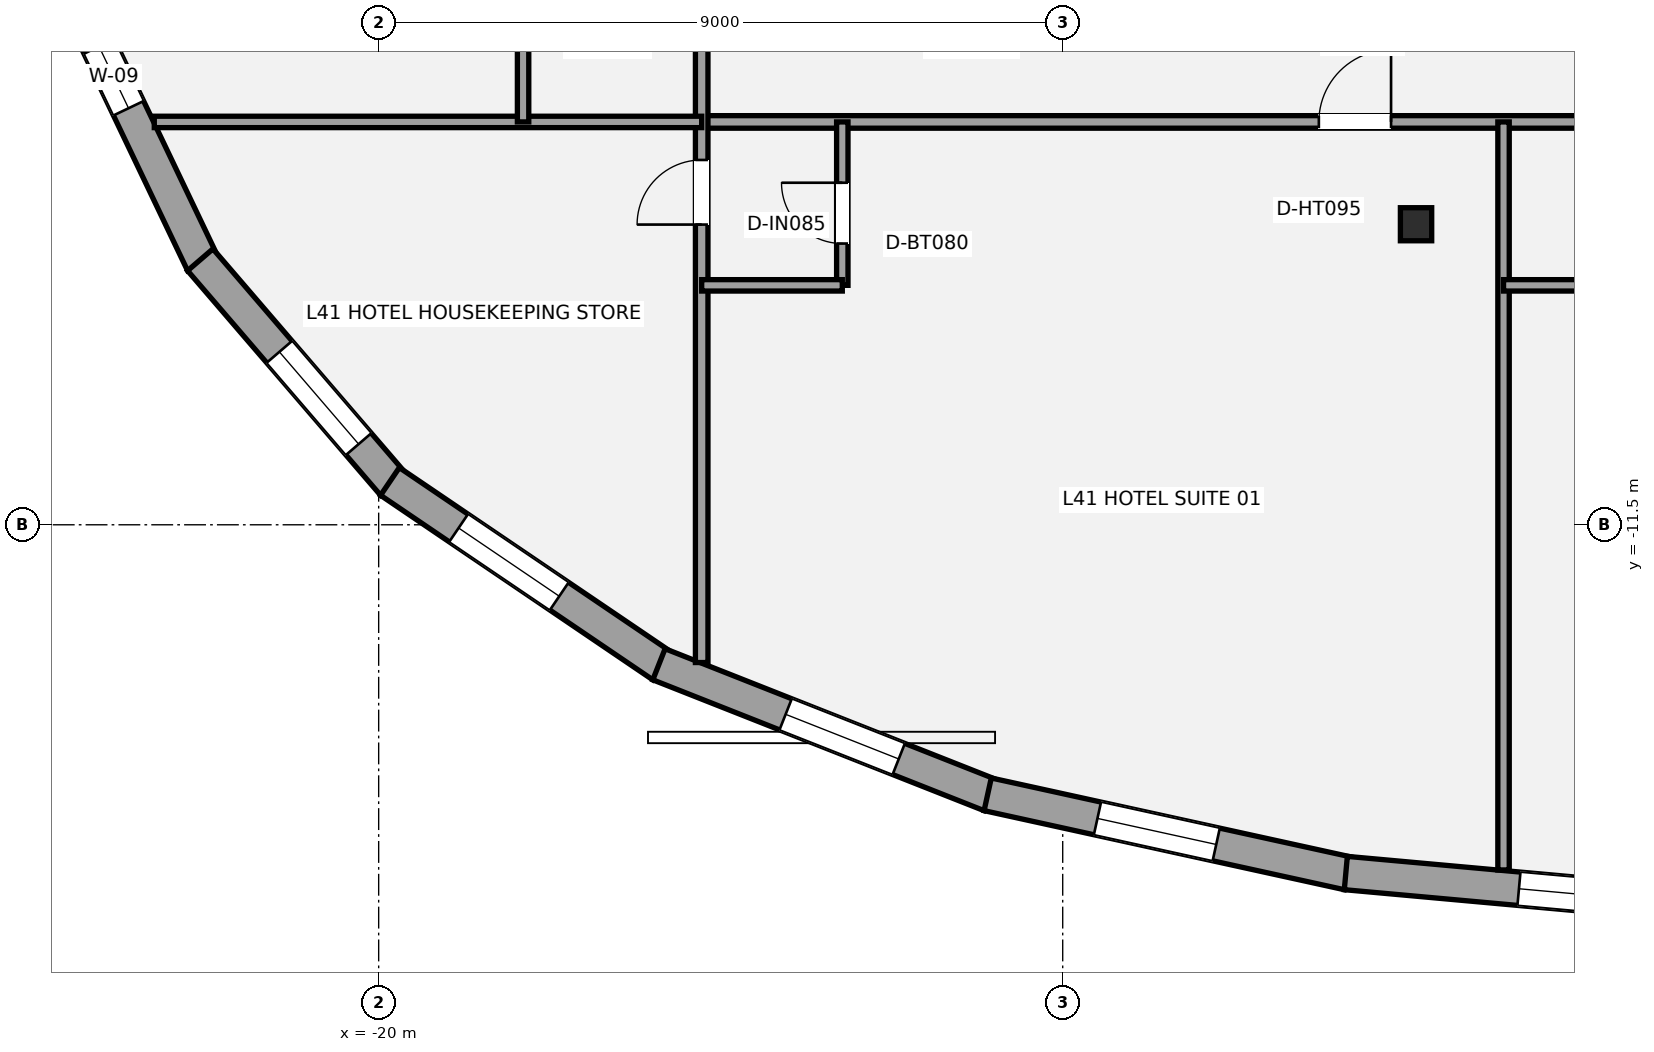
"""IFC4 building model, lengths in metres.
Left out: names, types, materials, properties, quantities, classifications, styles, units other than length and angle.
Written with IfcOpenShell. Run it as: python <this file> out.ifc"""

import sys

from ifc_helpers import new_model, si_unit, direction, frame, frame_2d, origin, origin_2d, place, context, subcontext, project, spatial, rectangle, i_section, extrude, element, fill, save


model = new_model("IFC4")
c1 = context("Model", 3, precision=1e-05, world=origin(), true_north=direction((0.0, 1.0)))
c2 = subcontext(c1, "Body", "Model", "MODEL_VIEW")
j1 = project(units=[si_unit("LENGTHUNIT", "METRE"), si_unit("PLANEANGLEUNIT", "RADIAN")], contexts=[c1])
p1 = place(None, origin())
s1 = spatial("IfcSite", under=j1, at=p1, CompositionType="ELEMENT")
p2 = place(p1, origin())
s2 = spatial("IfcBuilding", under=s1, at=p2, CompositionType="ELEMENT")
p3 = place(p2, frame((0.0, 0.0, 153.4)))
s3 = spatial("IfcBuildingStorey", under=s2, at=p3, CompositionType="ELEMENT", Elevation=153.4)
p4 = place(p3, frame((-6.351, -7.546, 0.0), z_axis=(0.0, 0.0, 1.0), x_axis=(1.0, 0.0, 0.0)))
e1 = element("IfcColumn", 1, at=p4, inside=s3, PredefinedType="COLUMN", context=c2, shape_type="SweptSolid", body=[
    extrude(i_section(OverallWidth=0.412, OverallDepth=0.435, WebThickness=0.036, FlangeThickness=0.057, at=origin_2d()), origin(), (0.0, 0.0, 1.0), 3.2),
])
p5 = place(p3, frame((-22.316, -8.062, 0.0), z_axis=(0.0, 0.0, 1.0), x_axis=(-0.430899691529, 0.902399831472, 0.0)))
e2 = element("IfcWall", 2, at=p5, inside=s3, PredefinedType="STANDARD", context=c2, shape_type="SweptSolid", body=[
    extrude(rectangle(XDim=3.56, YDim=0.44, at=frame_2d((1.78, 0.0))), origin(), (0.0, 0.0, 1.0), 2.315),
])
p6 = place(p5, frame((2.263, 0.0, 0.58)))
e3 = element("IfcOpeningElement", 3, at=p6, cuts=e2, PredefinedType="OPENING", context=c2, shape_type="SweptSolid", body=[
    extrude(rectangle(XDim=0.9, YDim=1.35, at=frame_2d((0.45, 0.675))), frame((0.0, 0.23, 0.0), z_axis=(0.0, -1.0, 0.0), x_axis=(1.0, 0.0, 0.0)), (0.0, 0.0, 1.0), 0.46),
])
p7 = place(p3, frame((-19.808, -10.969, 0.0), z_axis=(0.0, 0.0, 1.0), x_axis=(-0.651797156524, 0.758393345664, 0.0)))
e4 = element("IfcWall", 4, at=p7, inside=s3, PredefinedType="STANDARD", context=c2, shape_type="SweptSolid", body=[
    extrude(rectangle(XDim=3.896, YDim=0.44, at=frame_2d((1.948, 0.0))), origin(), (0.0, 0.0, 1.0), 2.315),
])
p8 = place(p7, frame((0.699, 0.0, 0.58)))
e5 = element("IfcOpeningElement", 5, at=p8, cuts=e4, PredefinedType="OPENING", context=c2, shape_type="SweptSolid", body=[
    extrude(rectangle(XDim=1.6, YDim=1.55, at=frame_2d((0.8, 0.775))), frame((0.0, 0.23, 0.0), z_axis=(0.0, -1.0, 0.0), x_axis=(1.0, 0.0, 0.0)), (0.0, 0.0, 1.0), 0.46),
])
p9 = place(p3, frame((-16.27, -13.358, 0.0), z_axis=(0.0, 0.0, 1.0), x_axis=(-0.827746250701, 0.561102614902, 0.0)))
e6 = element("IfcWall", 6, at=p9, inside=s3, PredefinedType="STANDARD", context=c2, shape_type="SweptSolid", body=[
    extrude(rectangle(XDim=4.327, YDim=0.44, at=frame_2d((2.164, 0.0))), origin(), (0.0, 0.0, 1.0), 2.315),
])
p10 = place(p9, frame((1.636, 0.0, 0.58)))
e7 = element("IfcOpeningElement", 7, at=p10, cuts=e6, PredefinedType="OPENING", context=c2, shape_type="SweptSolid", body=[
    extrude(rectangle(XDim=1.6, YDim=1.55, at=frame_2d((0.8, 0.775))), frame((0.0, 0.23, 0.0), z_axis=(0.0, -1.0, 0.0), x_axis=(1.0, 0.0, 0.0)), (0.0, 0.0, 1.0), 0.46),
])
p11 = place(p3, frame((-11.953, -15.056, 0.0), z_axis=(0.0, 0.0, 1.0), x_axis=(-0.930130872211, 0.367228213186, 0.0)))
e8 = element("IfcWall", 8, at=p11, inside=s3, PredefinedType="STANDARD", context=c2, shape_type="SweptSolid", body=[
    extrude(rectangle(XDim=4.686, YDim=0.44, at=frame_2d((2.343, 0.0))), origin(), (0.0, 0.0, 1.0), 2.315),
])
p12 = place(p11, frame((1.294, 0.0, 0.58)))
e9 = element("IfcOpeningElement", 9, at=p12, cuts=e8, PredefinedType="OPENING", context=c2, shape_type="SweptSolid", body=[
    extrude(rectangle(XDim=1.6, YDim=1.55, at=frame_2d((0.8, 0.775))), frame((0.0, 0.23, 0.0), z_axis=(0.0, -1.0, 0.0), x_axis=(1.0, 0.0, 0.0)), (0.0, 0.0, 1.0), 0.46),
])
p13 = place(p3, frame((-7.248, -16.086, 0.0), z_axis=(0.0, 0.0, 1.0), x_axis=(-0.976767211892, 0.214303088576, 0.0)))
e10 = element("IfcWall", 10, at=p13, inside=s3, PredefinedType="STANDARD", context=c2, shape_type="SweptSolid", body=[
    extrude(rectangle(XDim=4.852, YDim=0.44, at=frame_2d((2.426, 0.0))), origin(), (0.0, 0.0, 1.0), 2.315),
])
p14 = place(p13, frame((1.773, 0.0, 0.58)))
e11 = element("IfcOpeningElement", 11, at=p14, cuts=e10, PredefinedType="OPENING", context=c2, shape_type="SweptSolid", body=[
    extrude(rectangle(XDim=1.6, YDim=1.55, at=frame_2d((0.8, 0.775))), frame((0.0, 0.23, 0.0), z_axis=(0.0, -1.0, 0.0), x_axis=(1.0, 0.0, 0.0)), (0.0, 0.0, 1.0), 0.46),
])
p15 = place(p3, frame((-2.413, -16.523, 0.0), z_axis=(0.0, 0.0, 1.0), x_axis=(-0.995913675095, 0.090310308155, 0.0)))
e12 = element("IfcWall", 12, at=p15, inside=s3, PredefinedType="STANDARD", context=c2, shape_type="SweptSolid", body=[
    extrude(rectangle(XDim=4.882, YDim=0.44, at=frame_2d((2.441, 0.0))), origin(), (0.0, 0.0, 1.0), 2.315),
])
p16 = place(p15, frame((0.995, 0.0, 0.58)))
e13 = element("IfcOpeningElement", 13, at=p16, cuts=e12, PredefinedType="OPENING", context=c2, shape_type="SweptSolid", body=[
    extrude(rectangle(XDim=1.6, YDim=1.55, at=frame_2d((0.8, 0.775))), frame((0.0, 0.23, 0.0), z_axis=(0.0, -1.0, 0.0), x_axis=(1.0, 0.0, 0.0)), (0.0, 0.0, 1.0), 0.46),
])
p17 = place(p3, frame((-15.75, -6.2, 0.0), z_axis=(0.0, 0.0, 1.0), x_axis=(1.0, 0.0, 0.0)))
e14 = element("IfcWall", 14, at=p17, inside=s3, PredefinedType="PARTITIONING", context=c2, shape_type="SweptSolid", body=[
    extrude(rectangle(XDim=31.3, YDim=0.165, at=frame_2d((15.65, 0.0))), origin(), (0.0, 0.0, 1.0), 2.398),
])
p18 = place(p17, frame((8.12, 0.0, 0.0)))
e15 = element("IfcOpeningElement", 15, at=p18, cuts=e14, PredefinedType="OPENING", context=c2, shape_type="SweptSolid", body=[
    extrude(rectangle(XDim=0.95, YDim=2.15, at=frame_2d((0.475, 1.075))), frame((0.0, 0.093, 0.0), z_axis=(0.0, -1.0, 0.0), x_axis=(1.0, 0.0, 0.0)), (0.0, 0.0, 1.0), 0.185),
])
p19 = place(p17, frame((19.6, 0.0, 0.0)))
e16 = element("IfcOpeningElement", 16, at=p19, cuts=e14, PredefinedType="OPENING", context=c2, shape_type="SweptSolid", body=[
    extrude(rectangle(XDim=0.95, YDim=2.15, at=frame_2d((0.475, 1.075))), frame((0.0, 0.093, 0.0), z_axis=(0.0, -1.0, 0.0), x_axis=(1.0, 0.0, 0.0)), (0.0, 0.0, 1.0), 0.185),
])
p20 = place(p17, frame((29.95, 0.0, 0.0)))
e17 = element("IfcOpeningElement", 17, at=p20, cuts=e14, PredefinedType="OPENING", context=c2, shape_type="SweptSolid", body=[
    extrude(rectangle(XDim=0.95, YDim=2.15, at=frame_2d((0.475, 1.075))), frame((0.0, 0.093, 0.0), z_axis=(0.0, -1.0, 0.0), x_axis=(1.0, 0.0, 0.0)), (0.0, 0.0, 1.0), 0.185),
])
p21 = place(p3, frame((-15.75, -13.312, 0.0), z_axis=(0.0, 0.0, 1.0), x_axis=(0.0, 1.0, 0.0)))
e18 = element("IfcWall", 18, at=p21, inside=s3, PredefinedType="PARTITIONING", context=c2, shape_type="SweptSolid", body=[
    extrude(rectangle(XDim=20.862, YDim=0.165, at=frame_2d((10.431, 0.0))), origin(), (0.0, 0.0, 1.0), 2.473),
])
p22 = place(p21, frame((5.762, 0.0, 0.0)))
e19 = element("IfcOpeningElement", 19, at=p22, cuts=e18, PredefinedType="OPENING", context=c2, shape_type="SweptSolid", body=[
    extrude(rectangle(XDim=0.85, YDim=2.1, at=frame_2d((0.425, 1.05))), frame((0.0, 0.093, 0.0), z_axis=(0.0, -1.0, 0.0), x_axis=(1.0, 0.0, 0.0)), (0.0, 0.0, 1.0), 0.185),
])
p23 = place(p21, frame((10.162, 0.0, 0.0)))
e20 = element("IfcOpeningElement", 20, at=p23, cuts=e18, PredefinedType="OPENING", context=c2, shape_type="SweptSolid", body=[
    extrude(rectangle(XDim=0.95, YDim=2.15, at=frame_2d((0.475, 1.075))), frame((0.0, 0.093, 0.0), z_axis=(0.0, -1.0, 0.0), x_axis=(1.0, 0.0, 0.0)), (0.0, 0.0, 1.0), 0.185),
])
p24 = place(p21, frame((14.762, 0.0, 0.0)))
e21 = element("IfcOpeningElement", 21, at=p24, cuts=e18, PredefinedType="OPENING", context=c2, shape_type="SweptSolid", body=[
    extrude(rectangle(XDim=0.95, YDim=2.15, at=frame_2d((0.475, 1.075))), frame((0.0, 0.093, 0.0), z_axis=(0.0, -1.0, 0.0), x_axis=(1.0, 0.0, 0.0)), (0.0, 0.0, 1.0), 0.185),
])
p25 = place(p21, frame((19.512, 0.0, 0.0)))
e22 = element("IfcOpeningElement", 22, at=p25, cuts=e18, PredefinedType="OPENING", context=c2, shape_type="SweptSolid", body=[
    extrude(rectangle(XDim=0.95, YDim=2.15, at=frame_2d((0.475, 1.075))), frame((0.0, 0.093, 0.0), z_axis=(0.0, -1.0, 0.0), x_axis=(1.0, 0.0, 0.0)), (0.0, 0.0, 1.0), 0.185),
])
p26 = place(p3, frame((-22.952, -6.2, 0.0), z_axis=(0.0, 0.0, 1.0), x_axis=(1.0, 0.0, 0.0)))
e23 = element("IfcWall", 23, at=p26, inside=s3, PredefinedType="PLUMBINGWALL", context=c2, shape_type="SweptSolid", body=[
    extrude(rectangle(XDim=7.202, YDim=0.15, at=frame_2d((3.601, 0.0))), origin(), (0.0, 0.0, 1.0), 2.473),
])
p27 = place(p3, frame((-5.2, -16.041, 0.0), z_axis=(0.0, 0.0, 1.0), x_axis=(0.0, 1.0, 0.0)))
e24 = element("IfcWall", 24, at=p27, inside=s3, PredefinedType="PLUMBINGWALL", context=c2, shape_type="SweptSolid", body=[
    extrude(rectangle(XDim=9.841, YDim=0.15, at=frame_2d((4.92, 0.0))), origin(), (0.0, 0.0, 1.0), 2.473),
])
p28 = place(p3, frame((-13.9, -8.35, 0.0), z_axis=(0.0, 0.0, 1.0), x_axis=(0.0, 1.0, 0.0)))
e25 = element("IfcWall", 25, at=p28, inside=s3, PredefinedType="PLUMBINGWALL", context=c2, shape_type="SweptSolid", body=[
    extrude(rectangle(XDim=2.15, YDim=0.15, at=frame_2d((1.075, 0.0))), origin(), (0.0, 0.0, 1.0), 3.02),
])
p29 = place(p28, frame((0.55, 0.0, 0.0)))
e26 = element("IfcOpeningElement", 26, at=p29, cuts=e25, PredefinedType="OPENING", context=c2, shape_type="SweptSolid", body=[
    extrude(rectangle(XDim=0.8, YDim=2.1, at=frame_2d((0.4, 1.05))), frame((0.0, 0.085, 0.0), z_axis=(0.0, -1.0, 0.0), x_axis=(1.0, 0.0, 0.0)), (0.0, 0.0, 1.0), 0.17),
])
p30 = place(p3, frame((-15.75, -8.35, 0.0), z_axis=(0.0, 0.0, 1.0), x_axis=(1.0, 0.0, 0.0)))
e27 = element("IfcWall", 27, at=p30, inside=s3, PredefinedType="PLUMBINGWALL", context=c2, shape_type="SweptSolid", body=[
    extrude(rectangle(XDim=1.85, YDim=0.15, at=frame_2d((0.925, 0.0))), origin(), (0.0, 0.0, 1.0), 2.473),
])
p31 = place(p3, frame((-5.2, -8.35, 0.0), z_axis=(0.0, 0.0, 1.0), x_axis=(1.0, 0.0, 0.0)))
e28 = element("IfcWall", 28, at=p31, inside=s3, PredefinedType="PLUMBINGWALL", context=c2, shape_type="SweptSolid", body=[
    extrude(rectangle(XDim=1.85, YDim=0.15, at=frame_2d((0.925, 0.0))), origin(), (0.0, 0.0, 1.0), 2.473),
])
p32 = place(p3, frame((-18.1, -6.2, 0.0), z_axis=(0.0, 0.0, 1.0), x_axis=(0.0, 1.0, 0.0)))
e29 = element("IfcWall", 29, at=p32, inside=s3, PredefinedType="PLUMBINGWALL", context=c2, shape_type="SweptSolid", body=[
    extrude(rectangle(XDim=2.15, YDim=0.15, at=frame_2d((1.075, 0.0))), origin(), (0.0, 0.0, 1.0), 3.02),
])
p33 = place(p32, frame((1.0, 0.0, 0.0)))
e30 = element("IfcOpeningElement", 30, at=p33, cuts=e29, PredefinedType="OPENING", context=c2, shape_type="SweptSolid", body=[
    extrude(rectangle(XDim=0.8, YDim=2.1, at=frame_2d((0.4, 1.05))), frame((0.0, 0.085, 0.0), z_axis=(0.0, -1.0, 0.0), x_axis=(1.0, 0.0, 0.0)), (0.0, 0.0, 1.0), 0.17),
])
p34 = place(p6, origin())
e31 = element("IfcWindow", 31, at=p34, inside=s3, PartitioningType="SINGLE_PANEL", PredefinedType="WINDOW", context=c2, shape_type="SweptSolid", body=[
    extrude(rectangle(XDim=0.9, YDim=1.35, at=frame_2d((0.45, 0.675))), frame((0.0, -0.01, 0.0), z_axis=(0.0, -1.0, 0.0), x_axis=(1.0, 0.0, 0.0)), (0.0, 0.0, 1.0), 0.06),
])
fill(e3, e31)
p35 = place(p8, origin())
e32 = element("IfcWindow", 32, at=p35, inside=s3, PartitioningType="SINGLE_PANEL", PredefinedType="WINDOW", context=c2, shape_type="SweptSolid", body=[
    extrude(rectangle(XDim=1.6, YDim=1.55, at=frame_2d((0.8, 0.775))), frame((0.0, -0.01, 0.0), z_axis=(0.0, -1.0, 0.0), x_axis=(1.0, 0.0, 0.0)), (0.0, 0.0, 1.0), 0.06),
])
fill(e5, e32)
p36 = place(p10, origin())
e33 = element("IfcWindow", 33, at=p36, inside=s3, PartitioningType="SINGLE_PANEL", PredefinedType="WINDOW", context=c2, shape_type="SweptSolid", body=[
    extrude(rectangle(XDim=1.6, YDim=1.55, at=frame_2d((0.8, 0.775))), frame((0.0, -0.01, 0.0), z_axis=(0.0, -1.0, 0.0), x_axis=(1.0, 0.0, 0.0)), (0.0, 0.0, 1.0), 0.06),
])
fill(e7, e33)
p37 = place(p12, origin())
e34 = element("IfcWindow", 34, at=p37, inside=s3, PartitioningType="SINGLE_PANEL", PredefinedType="WINDOW", context=c2, shape_type="SweptSolid", body=[
    extrude(rectangle(XDim=1.6, YDim=1.55, at=frame_2d((0.8, 0.775))), frame((0.0, -0.01, 0.0), z_axis=(0.0, -1.0, 0.0), x_axis=(1.0, 0.0, 0.0)), (0.0, 0.0, 1.0), 0.06),
])
fill(e9, e34)
p38 = place(p14, origin())
e35 = element("IfcWindow", 35, at=p38, inside=s3, PartitioningType="SINGLE_PANEL", PredefinedType="WINDOW", context=c2, shape_type="SweptSolid", body=[
    extrude(rectangle(XDim=1.6, YDim=1.55, at=frame_2d((0.8, 0.775))), frame((0.0, -0.01, 0.0), z_axis=(0.0, -1.0, 0.0), x_axis=(1.0, 0.0, 0.0)), (0.0, 0.0, 1.0), 0.06),
])
fill(e11, e35)
p39 = place(p16, origin())
e36 = element("IfcWindow", 36, at=p39, inside=s3, PartitioningType="SINGLE_PANEL", PredefinedType="WINDOW", context=c2, shape_type="SweptSolid", body=[
    extrude(rectangle(XDim=1.6, YDim=1.55, at=frame_2d((0.8, 0.775))), frame((0.0, -0.01, 0.0), z_axis=(0.0, -1.0, 0.0), x_axis=(1.0, 0.0, 0.0)), (0.0, 0.0, 1.0), 0.06),
])
fill(e13, e36)
p40 = place(p22, origin())
e37 = element("IfcDoor", 37, at=p40, inside=s3, OperationType="SINGLE_SWING_LEFT", PredefinedType="DOOR", context=c2, shape_type="SweptSolid", body=[
    extrude(rectangle(XDim=0.85, YDim=2.1, at=frame_2d((0.425, 1.05))), frame((0.0, 0.025, 0.0), z_axis=(0.0, -1.0, 0.0), x_axis=(1.0, 0.0, 0.0)), (0.0, 0.0, 1.0), 0.05),
])
fill(e19, e37)
p41 = place(p18, origin())
e38 = element("IfcDoor", 38, at=p41, inside=s3, OperationType="SINGLE_SWING_RIGHT", PredefinedType="DOOR", context=c2, shape_type="SweptSolid", body=[
    extrude(rectangle(XDim=0.95, YDim=2.15, at=frame_2d((0.475, 1.075))), frame((0.0, 0.025, 0.0), z_axis=(0.0, -1.0, 0.0), x_axis=(1.0, 0.0, 0.0)), (0.0, 0.0, 1.0), 0.05),
])
fill(e15, e38)
p42 = place(p29, origin())
e39 = element("IfcDoor", 39, at=p42, inside=s3, OperationType="SINGLE_SWING_RIGHT", PredefinedType="DOOR", context=c2, shape_type="SweptSolid", body=[
    extrude(rectangle(XDim=0.8, YDim=2.1, at=frame_2d((0.4, 1.05))), frame((0.0, 0.025, 0.0), z_axis=(0.0, -1.0, 0.0), x_axis=(1.0, 0.0, 0.0)), (0.0, 0.0, 1.0), 0.05),
])
fill(e26, e39)
save(model, sys.argv[1])
